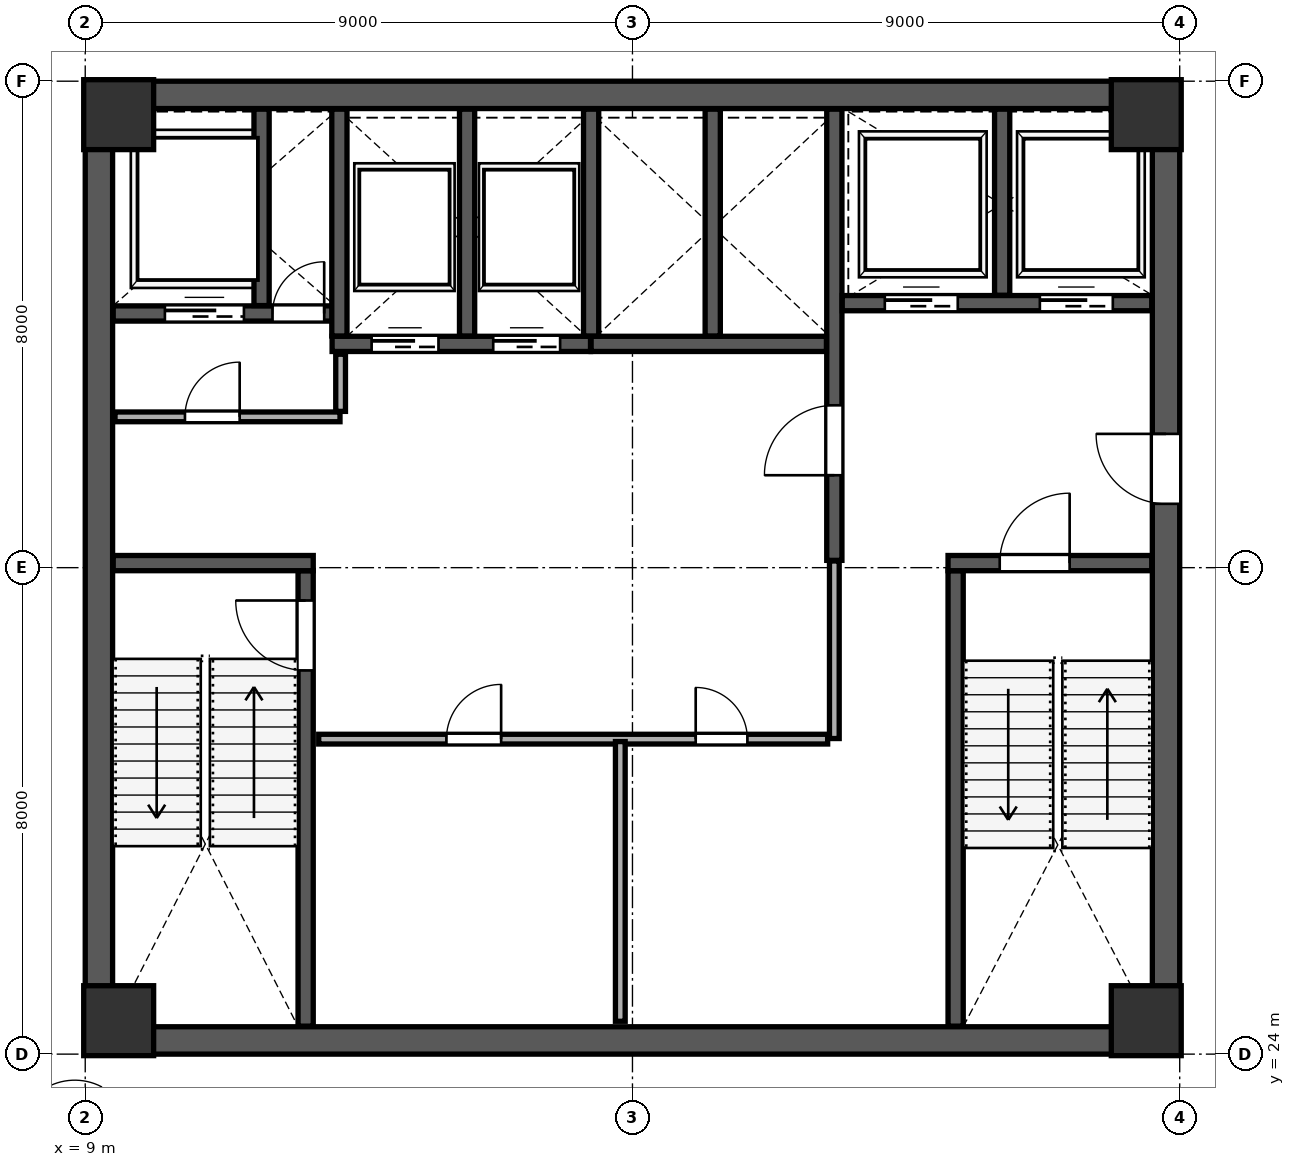
"""IFC4 building model, lengths in metres.
Left out: names, types, materials, properties, quantities, classifications, styles, units other than length and angle.
Written with IfcOpenShell. Run it as: python <this file> out.ifc"""

import sys

from ifc_helpers import new_model, si_unit, direction, frame, frame_2d, origin, origin_2d, place, context, subcontext, project, spatial, rectangle, extrude, source, transform, mapped, element, fill, save


model = new_model("IFC4")
c1 = context("Model", 3, precision=1e-05, world=origin(), true_north=direction((0.0, 1.0)))
c2 = subcontext(c1, "Body", "Model", "MODEL_VIEW")
j1 = project(units=[si_unit("LENGTHUNIT", "METRE"), si_unit("PLANEANGLEUNIT", "RADIAN")], contexts=[c1])
p1 = place(None, origin())
s1 = spatial("IfcSite", under=j1, at=p1, CompositionType="ELEMENT")
p2 = place(p1, origin())
s2 = spatial("IfcBuilding", under=s1, at=p2, CompositionType="ELEMENT")
p3 = place(p2, frame((0.0, 0.0, 166.6)))
s3 = spatial("IfcBuildingStorey", under=s2, at=p3, CompositionType="ELEMENT", Elevation=166.6)
m1 = source(origin(), c2, "Body", "SweptSolid", [
    extrude(rectangle(XDim=1.15, YDim=1.15, at=origin_2d()), origin(), (0.0, 0.0, 1.0), 4.198),
])
for number, where, z_axis, x_axis in (
    (1, (9.55, 24.55, 0.001), (0.0, 0.0, 1.0), (1.0, 0.0, 0.0)),
    (2, (26.45, 24.55, 0.001), (0.0, 0.0, 1.0), (1.0, 0.0, 0.0)),
    (3, (9.55, 39.45, 0.001), (0.0, 0.0, 1.0), (1.0, 0.0, 0.0)),
    (4, (26.45, 39.45, 0.001), (0.0, 0.0, 1.0), (1.0, 0.0, 0.0)),
):
    element("IfcColumn", number, at=place(p3, frame(where, z_axis=z_axis, x_axis=x_axis)), inside=s3, PredefinedType="COLUMN", context=c2, shape_type="MappedRepresentation", body=[
        mapped(m1, transform((0.0, 0.0, 0.0), scale=1.0)),
    ])
p4 = place(p3, frame((9.225, 24.45, 0.0), z_axis=(0.0, 0.0, 1.0), x_axis=(0.0, 1.0, 0.0)))
e5 = element("IfcWall", 5, at=p4, inside=s3, PredefinedType="SHEAR", context=c2, shape_type="SweptSolid", body=[
    extrude(rectangle(XDim=15.1, YDim=0.45, at=frame_2d((7.55, 0.0))), origin(), (0.0, 0.0, 1.0), 3.96),
])
p5 = place(p3, frame((26.775, 24.45, 0.0), z_axis=(0.0, 0.0, 1.0), x_axis=(0.0, 1.0, 0.0)))
e6 = element("IfcWall", 6, at=p5, inside=s3, PredefinedType="SHEAR", context=c2, shape_type="SweptSolid", body=[
    extrude(rectangle(XDim=15.1, YDim=0.45, at=frame_2d((7.55, 0.0))), origin(), (0.0, 0.0, 1.0), 3.96),
])
p6 = place(p5, frame((8.6, 0.0, 0.0)))
e7 = element("IfcOpeningElement", 7, at=p6, cuts=e6, PredefinedType="OPENING", context=c2, shape_type="SweptSolid", body=[
    extrude(rectangle(XDim=1.15, YDim=2.2, at=frame_2d((0.575, 1.1))), frame((0.0, 0.235, 0.0), z_axis=(0.0, -1.0, 0.0), x_axis=(1.0, 0.0, 0.0)), (0.0, 0.0, 1.0), 0.47),
])
for number, where, z_axis, x_axis in (
    (8, (9.0, 24.225, 0.0), (0.0, 0.0, 1.0), (1.0, 0.0, 0.0)),
    (9, (9.0, 39.775, 0.0), (0.0, 0.0, 1.0), (1.0, 0.0, 0.0)),
):
    element("IfcWall", number, at=place(p3, frame(where, z_axis=z_axis, x_axis=x_axis)), inside=s3, PredefinedType="SHEAR", context=c2, shape_type="SweptSolid", body=[
        extrude(rectangle(XDim=18.0, YDim=0.45, at=frame_2d((9.0, 0.0))), origin(), (0.0, 0.0, 1.0), 3.96),
    ])
p7 = place(p3, frame((12.625, 24.46, 0.0), z_axis=(0.0, 0.0, 1.0), x_axis=(0.0, 1.0, 0.0)))
e10 = element("IfcWall", 10, at=p7, inside=s3, PredefinedType="SHEAR", context=c2, shape_type="SweptSolid", body=[
    extrude(rectangle(XDim=7.49, YDim=0.25, at=frame_2d((3.745, 0.0))), origin(), (0.0, 0.0, 1.0), 3.96),
])
p8 = place(p7, frame((5.85, 0.0, 0.0)))
e11 = element("IfcOpeningElement", 11, at=p8, cuts=e10, PredefinedType="OPENING", context=c2, shape_type="SweptSolid", body=[
    extrude(rectangle(XDim=1.15, YDim=2.2, at=frame_2d((0.575, 1.1))), frame((0.0, 0.135, 0.0), z_axis=(0.0, -1.0, 0.0), x_axis=(1.0, 0.0, 0.0)), (0.0, 0.0, 1.0), 0.27),
])
p9 = place(p3, frame((9.46, 32.075, 0.0), z_axis=(0.0, 0.0, 1.0), x_axis=(1.0, 0.0, 0.0)))
e12 = element("IfcWall", 12, at=p9, inside=s3, PredefinedType="SHEAR", context=c2, shape_type="SweptSolid", body=[
    extrude(rectangle(XDim=3.29, YDim=0.25, at=frame_2d((1.645, 0.0))), origin(), (0.0, 0.0, 1.0), 3.96),
])
p10 = place(p3, frame((23.315, 24.46, 0.0), z_axis=(0.0, 0.0, 1.0), x_axis=(0.0, 1.0, 0.0)))
e13 = element("IfcWall", 13, at=p10, inside=s3, PredefinedType="SHEAR", context=c2, shape_type="SweptSolid", body=[
    extrude(rectangle(XDim=7.49, YDim=0.25, at=frame_2d((3.745, 0.0))), origin(), (0.0, 0.0, 1.0), 3.96),
])
p11 = place(p3, frame((23.19, 32.075, 0.0), z_axis=(0.0, 0.0, 1.0), x_axis=(1.0, 0.0, 0.0)))
e14 = element("IfcWall", 14, at=p11, inside=s3, PredefinedType="SHEAR", context=c2, shape_type="SweptSolid", body=[
    extrude(rectangle(XDim=3.35, YDim=0.25, at=frame_2d((1.675, 0.0))), origin(), (0.0, 0.0, 1.0), 3.96),
])
p12 = place(p11, frame((0.85, 0.0, 0.0)))
e15 = element("IfcOpeningElement", 15, at=p12, cuts=e14, PredefinedType="OPENING", context=c2, shape_type="SweptSolid", body=[
    extrude(rectangle(XDim=1.15, YDim=2.2, at=frame_2d((0.575, 1.1))), frame((0.0, 0.135, 0.0), z_axis=(0.0, -1.0, 0.0), x_axis=(1.0, 0.0, 0.0)), (0.0, 0.0, 1.0), 0.27),
])
p13 = place(p3, frame((21.32, 32.12, 0.0), z_axis=(0.0, 0.0, 1.0), x_axis=(0.0, 1.0, 0.0)))
e16 = element("IfcWall", 16, at=p13, inside=s3, PredefinedType="SHEAR", context=c2, shape_type="SweptSolid", body=[
    extrude(rectangle(XDim=7.42, YDim=0.25, at=frame_2d((3.71, 0.0))), origin(), (0.0, 0.0, 1.0), 3.96),
])
p14 = place(p13, frame((1.4, 0.0, 0.0)))
e17 = element("IfcOpeningElement", 17, at=p14, cuts=e16, PredefinedType="OPENING", context=c2, shape_type="SweptSolid", body=[
    extrude(rectangle(XDim=1.15, YDim=2.2, at=frame_2d((0.575, 1.1))), frame((0.0, 0.135, 0.0), z_axis=(0.0, -1.0, 0.0), x_axis=(1.0, 0.0, 0.0)), (0.0, 0.0, 1.0), 0.27),
])
p15 = place(p3, frame((9.46, 36.18, 0.0), z_axis=(0.0, 0.0, 1.0), x_axis=(1.0, 0.0, 0.0)))
e18 = element("IfcWall", 18, at=p15, inside=s3, PredefinedType="SHEAR", context=c2, shape_type="SweptSolid", body=[
    extrude(rectangle(XDim=3.79, YDim=0.25, at=frame_2d((1.895, 0.0))), origin(), (0.0, 0.0, 1.0), 3.96),
])
p16 = place(p15, frame((2.62, 0.0, 0.0)))
e19 = element("IfcOpeningElement", 19, at=p16, cuts=e18, PredefinedType="OPENING", context=c2, shape_type="SweptSolid", body=[
    extrude(rectangle(XDim=0.85, YDim=2.1, at=frame_2d((0.425, 1.05))), frame((0.0, 0.135, 0.0), z_axis=(0.0, -1.0, 0.0), x_axis=(1.0, 0.0, 0.0)), (0.0, 0.0, 1.0), 0.27),
])
p17 = place(p15, frame((0.85, 0.0, 0.0)))
e20 = element("IfcOpeningElement", 20, at=p17, cuts=e18, PredefinedType="OPENING", context=c2, shape_type="SweptSolid", body=[
    extrude(rectangle(XDim=1.3, YDim=2.25, at=frame_2d((0.65, 1.125))), frame((0.0, 0.135, 0.0), z_axis=(0.0, -1.0, 0.0), x_axis=(1.0, 0.0, 0.0)), (0.0, 0.0, 1.0), 0.27),
])
p18 = place(p3, frame((11.9, 36.31, 0.0), z_axis=(0.0, 0.0, 1.0), x_axis=(0.0, 1.0, 0.0)))
e21 = element("IfcWall", 21, at=p18, inside=s3, PredefinedType="SHEAR", context=c2, shape_type="SweptSolid", body=[
    extrude(rectangle(XDim=3.23, YDim=0.25, at=frame_2d((1.615, 0.0))), origin(), (0.0, 0.0, 1.0), 3.96),
])
p19 = place(p3, frame((21.45, 36.35, 0.0), z_axis=(0.0, 0.0, 1.0), x_axis=(1.0, 0.0, 0.0)))
e22 = element("IfcWall", 22, at=p19, inside=s3, PredefinedType="SHEAR", context=c2, shape_type="SweptSolid", body=[
    extrude(rectangle(XDim=5.09, YDim=0.25, at=frame_2d((2.545, 0.0))), origin(), (0.0, 0.0, 1.0), 3.96),
])
p20 = place(p19, frame((0.7, 0.0, 0.0)))
e23 = element("IfcOpeningElement", 23, at=p20, cuts=e22, PredefinedType="OPENING", context=c2, shape_type="SweptSolid", body=[
    extrude(rectangle(XDim=1.2, YDim=2.2, at=frame_2d((0.6, 1.1))), frame((0.0, 0.135, 0.0), z_axis=(0.0, -1.0, 0.0), x_axis=(1.0, 0.0, 0.0)), (0.0, 0.0, 1.0), 0.27),
])
p21 = place(p19, frame((3.25, 0.0, 0.0)))
e24 = element("IfcOpeningElement", 24, at=p21, cuts=e22, PredefinedType="OPENING", context=c2, shape_type="SweptSolid", body=[
    extrude(rectangle(XDim=1.2, YDim=2.2, at=frame_2d((0.6, 1.1))), frame((0.0, 0.135, 0.0), z_axis=(0.0, -1.0, 0.0), x_axis=(1.0, 0.0, 0.0)), (0.0, 0.0, 1.0), 0.27),
])
p22 = place(p3, frame((24.08, 36.48, 0.0), z_axis=(0.0, 0.0, 1.0), x_axis=(0.0, 1.0, 0.0)))
e25 = element("IfcWall", 25, at=p22, inside=s3, PredefinedType="SHEAR", context=c2, shape_type="SweptSolid", body=[
    extrude(rectangle(XDim=3.06, YDim=0.25, at=frame_2d((1.53, 0.0))), origin(), (0.0, 0.0, 1.0), 3.96),
])
p23 = place(p3, frame((13.06, 35.68, 0.0), z_axis=(0.0, 0.0, 1.0), x_axis=(1.0, 0.0, 0.0)))
e26 = element("IfcWall", 26, at=p23, inside=s3, PredefinedType="SHEAR", context=c2, shape_type="SweptSolid", body=[
    extrude(rectangle(XDim=4.25, YDim=0.25, at=frame_2d((2.125, 0.0))), origin(), (0.0, 0.0, 1.0), 3.96),
])
p24 = place(p23, frame((0.65, 0.0, 0.0)))
e27 = element("IfcOpeningElement", 27, at=p24, cuts=e26, PredefinedType="OPENING", context=c2, shape_type="SweptSolid", body=[
    extrude(rectangle(XDim=1.1, YDim=2.2, at=frame_2d((0.55, 1.1))), frame((0.0, 0.135, 0.0), z_axis=(0.0, -1.0, 0.0), x_axis=(1.0, 0.0, 0.0)), (0.0, 0.0, 1.0), 0.27),
])
p25 = place(p23, frame((2.65, 0.0, 0.0)))
e28 = element("IfcOpeningElement", 28, at=p25, cuts=e26, PredefinedType="OPENING", context=c2, shape_type="SweptSolid", body=[
    extrude(rectangle(XDim=1.1, YDim=2.2, at=frame_2d((0.55, 1.1))), frame((0.0, 0.135, 0.0), z_axis=(0.0, -1.0, 0.0), x_axis=(1.0, 0.0, 0.0)), (0.0, 0.0, 1.0), 0.27),
])
for number, where, z_axis, x_axis in (
    (29, (13.18, 35.81, 0.0), (0.0, 0.0, 1.0), (0.0, 1.0, 0.0)),
    (30, (15.28, 35.81, 0.0), (0.0, 0.0, 1.0), (0.0, 1.0, 0.0)),
):
    element("IfcWall", number, at=place(p3, frame(where, z_axis=z_axis, x_axis=x_axis)), inside=s3, PredefinedType="SHEAR", context=c2, shape_type="SweptSolid", body=[
        extrude(rectangle(XDim=3.73, YDim=0.25, at=frame_2d((1.865, 0.0))), origin(), (0.0, 0.0, 1.0), 3.96),
    ])
p26 = place(p3, frame((17.32, 35.68, 0.0), z_axis=(0.0, 0.0, 1.0), x_axis=(1.0, 0.0, 0.0)))
e31 = element("IfcWall", 31, at=p26, inside=s3, PredefinedType="SHEAR", context=c2, shape_type="SweptSolid", body=[
    extrude(rectangle(XDim=3.87, YDim=0.25, at=frame_2d((1.935, 0.0))), origin(), (0.0, 0.0, 1.0), 3.96),
])
for number, where, z_axis, x_axis in (
    (32, (17.32, 35.81, 0.0), (0.0, 0.0, 1.0), (0.0, 1.0, 0.0)),
    (33, (19.32, 35.81, 0.0), (0.0, 0.0, 1.0), (0.0, 1.0, 0.0)),
):
    element("IfcWall", number, at=place(p3, frame(where, z_axis=z_axis, x_axis=x_axis)), inside=s3, PredefinedType="SHEAR", context=c2, shape_type="SweptSolid", body=[
        extrude(rectangle(XDim=3.73, YDim=0.25, at=frame_2d((1.865, 0.0))), origin(), (0.0, 0.0, 1.0), 3.96),
    ])
p27 = place(p3, frame((9.49, 34.48, 0.0), z_axis=(0.0, 0.0, 1.0), x_axis=(1.0, 0.0, 0.0)))
e34 = element("IfcWall", 34, at=p27, inside=s3, PredefinedType="PARTITIONING", context=c2, shape_type="SweptSolid", body=[
    extrude(rectangle(XDim=3.7, YDim=0.16, at=frame_2d((1.85, 0.0))), origin(), (0.0, 0.0, 1.0), 3.96),
])
p28 = place(p27, frame((1.15, 0.0, 0.0)))
e35 = element("IfcOpeningElement", 35, at=p28, cuts=e34, PredefinedType="OPENING", context=c2, shape_type="SweptSolid", body=[
    extrude(rectangle(XDim=0.9, YDim=2.15, at=frame_2d((0.45, 1.075))), frame((0.0, 0.09, 0.0), z_axis=(0.0, -1.0, 0.0), x_axis=(1.0, 0.0, 0.0)), (0.0, 0.0, 1.0), 0.18),
])
p29 = place(p3, frame((13.2, 34.57, 0.0), z_axis=(0.0, 0.0, 1.0), x_axis=(0.0, 1.0, 0.0)))
e36 = element("IfcWall", 36, at=p29, inside=s3, PredefinedType="PARTITIONING", context=c2, shape_type="SweptSolid", body=[
    extrude(rectangle(XDim=0.94, YDim=0.16, at=frame_2d((0.47, 0.0))), origin(), (0.0, 0.0, 1.0), 3.96),
])
p30 = place(p3, frame((12.84, 29.18, 0.0), z_axis=(0.0, 0.0, 1.0), x_axis=(1.0, 0.0, 0.0)))
e37 = element("IfcWall", 37, at=p30, inside=s3, PredefinedType="PARTITIONING", context=c2, shape_type="SweptSolid", body=[
    extrude(rectangle(XDim=8.37, YDim=0.16, at=frame_2d((4.185, 0.0))), origin(), (0.0, 0.0, 1.0), 3.96),
])
p31 = place(p30, frame((2.1, 0.0, 0.0)))
e38 = element("IfcOpeningElement", 38, at=p31, cuts=e37, PredefinedType="OPENING", context=c2, shape_type="SweptSolid", body=[
    extrude(rectangle(XDim=0.9, YDim=2.15, at=frame_2d((0.45, 1.075))), frame((0.0, 0.09, 0.0), z_axis=(0.0, -1.0, 0.0), x_axis=(1.0, 0.0, 0.0)), (0.0, 0.0, 1.0), 0.18),
])
p32 = place(p30, frame((6.2, 0.0, 0.0)))
e39 = element("IfcOpeningElement", 39, at=p32, cuts=e37, PredefinedType="OPENING", context=c2, shape_type="SweptSolid", body=[
    extrude(rectangle(XDim=0.85, YDim=2.1, at=frame_2d((0.425, 1.05))), frame((0.0, 0.09, 0.0), z_axis=(0.0, -1.0, 0.0), x_axis=(1.0, 0.0, 0.0)), (0.0, 0.0, 1.0), 0.18),
])
p33 = place(p3, frame((17.8, 24.54, 0.0), z_axis=(0.0, 0.0, 1.0), x_axis=(0.0, 1.0, 0.0)))
e40 = element("IfcWall", 40, at=p33, inside=s3, PredefinedType="PARTITIONING", context=c2, shape_type="SweptSolid", body=[
    extrude(rectangle(XDim=4.6, YDim=0.16, at=frame_2d((2.3, 0.0))), origin(), (0.0, 0.0, 1.0), 3.96),
])
p34 = place(p3, frame((21.32, 29.19, 0.0), z_axis=(0.0, 0.0, 1.0), x_axis=(0.0, 1.0, 0.0)))
e41 = element("IfcWall", 41, at=p34, inside=s3, PredefinedType="PARTITIONING", context=c2, shape_type="SweptSolid", body=[
    extrude(rectangle(XDim=2.92, YDim=0.16, at=frame_2d((1.46, 0.0))), origin(), (0.0, 0.0, 1.0), 3.96),
])
p35 = place(p3, frame((6.699, 23.73, 0.0), z_axis=(0.0, 0.0, 1.0), x_axis=(0.887009683963, -0.46175082085, 0.0)))
e42 = element("IfcWall", 42, at=p35, inside=s3, PredefinedType="PARTITIONING", context=c2, shape_type="SweptSolid", body=[
    extrude(rectangle(XDim=19.81, YDim=0.16, at=frame_2d((9.905, 0.0))), origin(), (0.0, 0.0, 1.0), 3.96),
])
p36 = place(p35, frame((1.45, 0.0, 0.0)))
e43 = element("IfcOpeningElement", 43, at=p36, cuts=e42, PredefinedType="OPENING", context=c2, shape_type="SweptSolid", body=[
    extrude(rectangle(XDim=0.95, YDim=2.15, at=frame_2d((0.475, 1.075))), frame((0.0, 0.09, 0.0), z_axis=(0.0, -1.0, 0.0), x_axis=(1.0, 0.0, 0.0)), (0.0, 0.0, 1.0), 0.18),
])
p37 = place(p3, frame((11.104, 49.971, 0.0), z_axis=(0.0, 0.0, 1.0), x_axis=(0.887010001249, -0.461750211353, 0.0)))
e44 = element("IfcWall", 44, at=p37, inside=s3, PredefinedType="PARTITIONING", context=c2, shape_type="SweptSolid", body=[
    extrude(rectangle(XDim=28.02, YDim=0.115, at=frame_2d((14.01, 0.0))), origin(), (0.0, 0.0, 1.0), 3.96),
])
p38 = place(p37, frame((20.31, 0.0, 0.0)))
e45 = element("IfcOpeningElement", 45, at=p38, cuts=e44, PredefinedType="OPENING", context=c2, shape_type="SweptSolid", body=[
    extrude(rectangle(XDim=0.95, YDim=2.15, at=frame_2d((0.475, 1.075))), frame((0.0, 0.067, 0.0), z_axis=(0.0, -1.0, 0.0), x_axis=(1.0, 0.0, 0.0)), (0.0, 0.0, 1.0), 0.135),
])
m2 = source(origin(), c2, "Body", "SweptSolid", [
    extrude(rectangle(XDim=1.15, YDim=2.2, at=frame_2d((0.575, 1.1))), frame((0.0, 0.025, 0.0), z_axis=(0.0, -1.0, 0.0), x_axis=(1.0, 0.0, 0.0)), (0.0, 0.0, 1.0), 0.05),
])
p39 = place(p8, origin())
e46 = element("IfcDoor", 46, at=p39, inside=s3, OperationType="SINGLE_SWING_RIGHT", PredefinedType="DOOR", context=c2, shape_type="MappedRepresentation", body=[
    mapped(m2, transform((0.0, 0.0, 0.0), scale=1.0)),
])
fill(e11, e46)
m3 = source(origin(), c2, "Body", "SweptSolid", [
    extrude(rectangle(XDim=1.15, YDim=2.2, at=frame_2d((0.575, 1.1))), frame((0.0, 0.025, 0.0), z_axis=(0.0, -1.0, 0.0), x_axis=(1.0, 0.0, 0.0)), (0.0, 0.0, 1.0), 0.05),
])
p40 = place(p14, origin())
e47 = element("IfcDoor", 47, at=p40, inside=s3, OperationType="SINGLE_SWING_LEFT", PredefinedType="DOOR", context=c2, shape_type="MappedRepresentation", body=[
    mapped(m3, transform((0.0, 0.0, 0.0), scale=1.0)),
])
fill(e17, e47)
p41 = place(p12, origin())
e48 = element("IfcDoor", 48, at=p41, inside=s3, OperationType="SINGLE_SWING_RIGHT", PredefinedType="DOOR", context=c2, shape_type="MappedRepresentation", body=[
    mapped(m2, transform((0.0, 0.0, 0.0), scale=1.0)),
])
fill(e15, e48)
p42 = place(p6, origin())
e49 = element("IfcDoor", 49, at=p42, inside=s3, OperationType="SINGLE_SWING_RIGHT", PredefinedType="DOOR", context=c2, shape_type="MappedRepresentation", body=[
    mapped(m3, transform((0.0, 0.0, 0.0), scale=1.0)),
])
fill(e7, e49)
m4 = source(origin(), c2, "Body", "SweptSolid", [
    extrude(rectangle(XDim=0.85, YDim=2.1, at=frame_2d((0.425, 1.05))), frame((0.0, 0.025, 0.0), z_axis=(0.0, -1.0, 0.0), x_axis=(1.0, 0.0, 0.0)), (0.0, 0.0, 1.0), 0.05),
])
p43 = place(p16, origin())
e50 = element("IfcDoor", 50, at=p43, inside=s3, OperationType="SINGLE_SWING_RIGHT", PredefinedType="DOOR", context=c2, shape_type="MappedRepresentation", body=[
    mapped(m4, transform((0.0, 0.0, 0.0), scale=1.0)),
])
fill(e19, e50)
m5 = source(origin(), c2, "Body", "SweptSolid", [
    extrude(rectangle(XDim=1.1, YDim=2.2, at=frame_2d((0.55, 1.1))), frame((0.0, 0.025, 0.0), z_axis=(0.0, -1.0, 0.0), x_axis=(1.0, 0.0, 0.0)), (0.0, 0.0, 1.0), 0.05),
])
p44 = place(p24, origin())
e51 = element("IfcDoor", 51, at=p44, inside=s3, OperationType="SLIDING_TO_LEFT", PredefinedType="DOOR", context=c2, shape_type="MappedRepresentation", body=[
    mapped(m5, transform((0.0, 0.0, 0.0), scale=1.0)),
])
fill(e27, e51)
p45 = place(p25, origin())
e52 = element("IfcDoor", 52, at=p45, inside=s3, OperationType="SLIDING_TO_RIGHT", PredefinedType="DOOR", context=c2, shape_type="MappedRepresentation", body=[
    mapped(m5, transform((0.0, 0.0, 0.0), scale=1.0)),
])
fill(e28, e52)
m6 = source(origin(), c2, "Body", "SweptSolid", [
    extrude(rectangle(XDim=1.2, YDim=2.2, at=frame_2d((0.6, 1.1))), frame((0.0, 0.025, 0.0), z_axis=(0.0, -1.0, 0.0), x_axis=(1.0, 0.0, 0.0)), (0.0, 0.0, 1.0), 0.05),
])
p46 = place(p20, origin())
e53 = element("IfcDoor", 53, at=p46, inside=s3, OperationType="SLIDING_TO_LEFT", PredefinedType="DOOR", context=c2, shape_type="MappedRepresentation", body=[
    mapped(m6, transform((0.0, 0.0, 0.0), scale=1.0)),
])
fill(e23, e53)
p47 = place(p21, origin())
e54 = element("IfcDoor", 54, at=p47, inside=s3, OperationType="SLIDING_TO_RIGHT", PredefinedType="DOOR", context=c2, shape_type="MappedRepresentation", body=[
    mapped(m6, transform((0.0, 0.0, 0.0), scale=1.0)),
])
fill(e24, e54)
m7 = source(origin(), c2, "Body", "SweptSolid", [
    extrude(rectangle(XDim=1.3, YDim=2.25, at=frame_2d((0.65, 1.125))), frame((0.0, 0.025, 0.0), z_axis=(0.0, -1.0, 0.0), x_axis=(1.0, 0.0, 0.0)), (0.0, 0.0, 1.0), 0.05),
])
p48 = place(p17, origin())
e55 = element("IfcDoor", 55, at=p48, inside=s3, OperationType="SLIDING_TO_LEFT", PredefinedType="DOOR", context=c2, shape_type="MappedRepresentation", body=[
    mapped(m7, transform((0.0, 0.0, 0.0), scale=1.0)),
])
fill(e20, e55)
m8 = source(origin(), c2, "Body", "SweptSolid", [
    extrude(rectangle(XDim=0.9, YDim=2.15, at=frame_2d((0.45, 1.075))), frame((0.0, 0.025, 0.0), z_axis=(0.0, -1.0, 0.0), x_axis=(1.0, 0.0, 0.0)), (0.0, 0.0, 1.0), 0.05),
])
p49 = place(p28, origin())
e56 = element("IfcDoor", 56, at=p49, inside=s3, OperationType="SINGLE_SWING_RIGHT", PredefinedType="DOOR", context=c2, shape_type="MappedRepresentation", body=[
    mapped(m8, transform((0.0, 0.0, 0.0), scale=1.0)),
])
fill(e35, e56)
p50 = place(p31, origin())
e57 = element("IfcDoor", 57, at=p50, inside=s3, OperationType="SINGLE_SWING_RIGHT", PredefinedType="DOOR", context=c2, shape_type="MappedRepresentation", body=[
    mapped(m8, transform((0.0, 0.0, 0.0), scale=1.0)),
])
fill(e38, e57)
p51 = place(p32, origin())
e58 = element("IfcDoor", 58, at=p51, inside=s3, OperationType="SINGLE_SWING_LEFT", PredefinedType="DOOR", context=c2, shape_type="MappedRepresentation", body=[
    mapped(m4, transform((0.0, 0.0, 0.0), scale=1.0)),
])
fill(e39, e58)
save(model, sys.argv[1])
